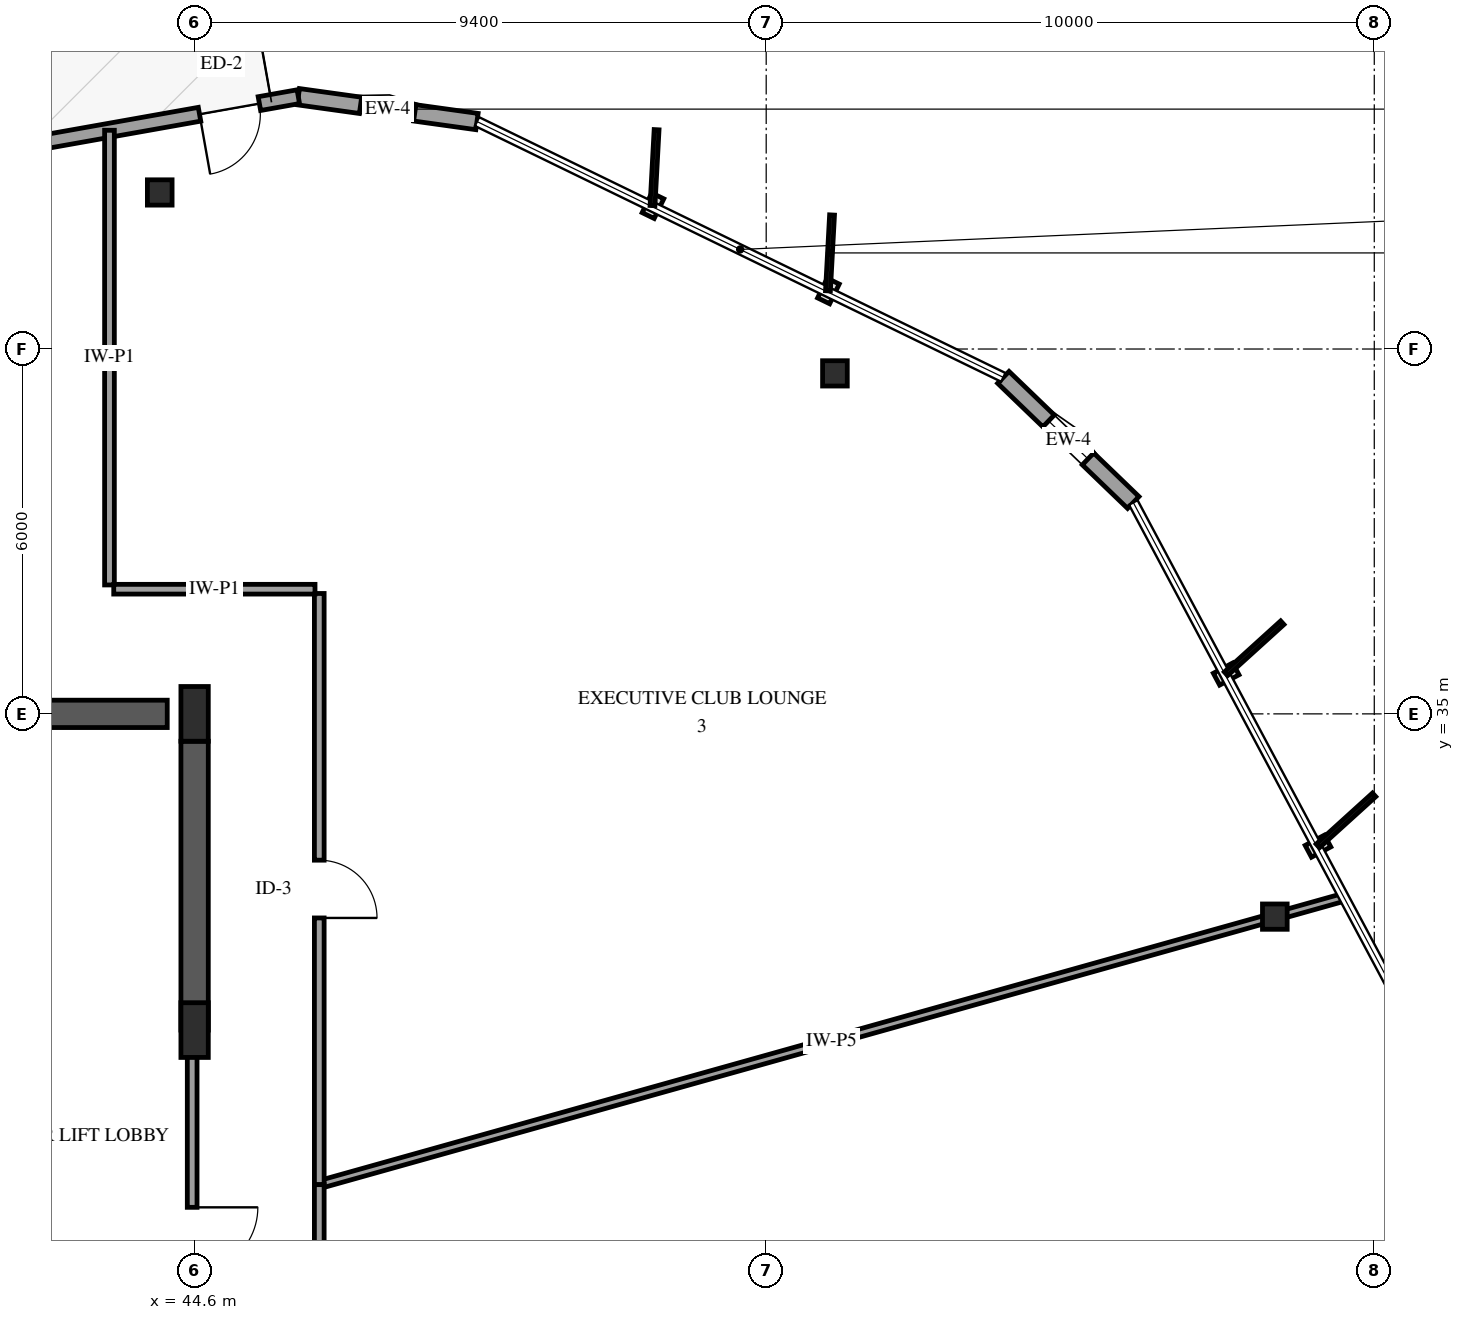
"""IFC4 building model, lengths in metres.
Left out: names, types, materials, properties, quantities, classifications, styles, units other than length and angle.
Written with IfcOpenShell. Run it as: python <this file> out.ifc"""

import sys

from ifc_helpers import new_model, si_unit, direction, frame, frame_2d, origin, origin_2d, place, context, subcontext, project, spatial, rectangle, i_section, extrude, element, fill, save


model = new_model("IFC4")
c1 = context("Model", 3, precision=1e-05, world=origin(), true_north=direction((0.0, 1.0)))
c2 = subcontext(c1, "Body", "Model", "MODEL_VIEW")
j1 = project(units=[si_unit("LENGTHUNIT", "METRE"), si_unit("PLANEANGLEUNIT", "RADIAN")], contexts=[c1])
p1 = place(None, origin())
s1 = spatial("IfcSite", under=j1, at=p1, CompositionType="ELEMENT")
p2 = place(p1, origin())
s2 = spatial("IfcBuilding", under=s1, at=p2, CompositionType="ELEMENT")
p3 = place(p2, frame((0.0, 0.0, 205.0)))
s3 = spatial("IfcBuildingStorey", under=s2, at=p3, CompositionType="ELEMENT", Elevation=205.0)
p4 = place(p3, frame((41.3, 35.0, 0.0), z_axis=(0.0, 0.0, 1.0), x_axis=(1.0, 0.0, 0.0)))
e1 = element("IfcWall", 1, at=p4, inside=s3, PredefinedType="SHEAR", context=c2, shape_type="SweptSolid", body=[
    extrude(rectangle(XDim=2.85, YDim=0.45, at=frame_2d((1.425, 0.0))), origin(), (0.0, 0.0, 1.0), 3.6),
])
p5 = place(p3, frame((44.6, 29.8, 0.0), z_axis=(0.0, 0.0, 1.0), x_axis=(0.0, 1.0, 0.0)))
e2 = element("IfcWall", 2, at=p5, inside=s3, PredefinedType="SHEAR", context=c2, shape_type="SweptSolid", body=[
    extrude(rectangle(XDim=4.75, YDim=0.45, at=frame_2d((2.375, 0.0))), origin(), (0.0, 0.0, 1.0), 3.6),
])
for number, where, z_axis, x_axis in (
    (3, (44.6, 29.8, 0.0), (0.0, 0.0, 1.0), (1.0, 0.0, 0.0)),
    (4, (44.6, 35.0, 0.0), (0.0, 0.0, 1.0), (1.0, 0.0, 0.0)),
):
    element("IfcColumn", number, at=place(p3, frame(where, z_axis=z_axis, x_axis=x_axis)), inside=s3, PredefinedType="PILASTER", context=c2, shape_type="SweptSolid", body=[
        extrude(rectangle(XDim=0.45, YDim=0.9, at=origin_2d()), origin(), (0.0, 0.0, 1.0), 3.6),
    ])
for number, where, z_axis, x_axis in (
    (5, (62.365, 31.666, 0.0), (0.0, 0.0, 1.0), (1.0, 0.0, 0.0)),
    (6, (55.13, 40.599, 0.0), (0.0, 0.0, 1.0), (1.0, 0.0, 0.0)),
    (7, (44.027, 43.574, 0.0), (0.0, 0.0, 1.0), (1.0, 0.0, 0.0)),
):
    element("IfcColumn", number, at=place(p3, frame(where, z_axis=z_axis, x_axis=x_axis)), inside=s3, PredefinedType="COLUMN", context=c2, shape_type="SweptSolid", body=[
        extrude(i_section(OverallWidth=0.406, OverallDepth=0.416, WebThickness=0.03, FlangeThickness=0.048, FilletRadius=0.038, at=origin_2d()), origin(), (0.0, 0.0, 1.0), 3.6),
    ])
p6 = place(p3, frame((49.244, 44.741, 0.0), z_axis=(0.0, 0.0, 1.0), x_axis=(-0.990464529439, 0.137767978586, 0.0)))
e8 = element("IfcWall", 8, at=p6, inside=s3, PredefinedType="SOLIDWALL", context=c2, shape_type="SweptSolid", body=[
    extrude(rectangle(XDim=2.967, YDim=0.27, at=frame_2d((1.483, 0.0))), origin(), (0.0, 0.0, 1.0), 2.679),
])
p7 = place(p6, frame((1.033, 0.0, 0.75)))
e9 = element("IfcOpeningElement", 9, at=p7, cuts=e8, PredefinedType="OPENING", context=c2, shape_type="SweptSolid", body=[
    extrude(rectangle(XDim=0.9, YDim=1.5, at=frame_2d((0.45, 0.75))), frame((0.0, 0.145, 0.0), z_axis=(0.0, -1.0, 0.0), x_axis=(1.0, 0.0, 0.0)), (0.0, 0.0, 1.0), 0.29),
])
p8 = place(p3, frame((46.306, 45.149, 0.0), z_axis=(0.0, 0.0, 1.0), x_axis=(-0.984566490569, -0.175010930084, 0.0)))
e10 = element("IfcWall", 10, at=p8, inside=s3, PredefinedType="SOLIDWALL", context=c2, shape_type="SweptSolid", body=[
    extrude(rectangle(XDim=9.624, YDim=0.23, at=frame_2d((4.812, 0.0))), origin(), (0.0, 0.0, 1.0), 2.679),
])
p9 = place(p8, frame((0.65, 0.0, 0.0)))
e11 = element("IfcOpeningElement", 11, at=p9, cuts=e10, PredefinedType="OPENING", context=c2, shape_type="SweptSolid", body=[
    extrude(rectangle(XDim=1.0, YDim=2.15, at=frame_2d((0.5, 1.075))), frame((0.0, 0.125, 0.0), z_axis=(0.0, -1.0, 0.0), x_axis=(1.0, 0.0, 0.0)), (0.0, 0.0, 1.0), 0.25),
])
p10 = place(p8, frame((5.986, 0.0, 0.72)))
e12 = element("IfcOpeningElement", 12, at=p10, cuts=e10, PredefinedType="OPENING", context=c2, shape_type="SweptSolid", body=[
    extrude(rectangle(XDim=1.35, YDim=1.65, at=frame_2d((0.675, 0.825))), frame((0.0, 0.125, 0.0), z_axis=(0.0, -1.0, 0.0), x_axis=(1.0, 0.0, 0.0)), (0.0, 0.0, 1.0), 0.25),
])
p11 = place(p3, frame((63.76, 17.532, 0.0), z_axis=(0.0, 0.0, 1.0), x_axis=(0.137794425401, 0.990460850477, 0.0)))
e13 = element("IfcWall", 13, at=p11, inside=s3, PredefinedType="SOLIDWALL", context=c2, shape_type="SweptSolid", body=[
    extrude(rectangle(XDim=9.624, YDim=0.23, at=frame_2d((4.812, 0.0))), origin(), (0.0, 0.0, 1.0), 2.679),
])
p12 = place(p11, frame((4.312, 0.0, 0.0)))
e14 = element("IfcOpeningElement", 14, at=p12, cuts=e13, PredefinedType="OPENING", context=c2, shape_type="SweptSolid", body=[
    extrude(rectangle(XDim=1.0, YDim=2.15, at=frame_2d((0.5, 1.075))), frame((0.0, 0.125, 0.0), z_axis=(0.0, -1.0, 0.0), x_axis=(1.0, 0.0, 0.0)), (0.0, 0.0, 1.0), 0.25),
])
p13 = place(p11, frame((0.44, 0.0, 0.72)))
e15 = element("IfcOpeningElement", 15, at=p13, cuts=e13, PredefinedType="OPENING", context=c2, shape_type="SweptSolid", body=[
    extrude(rectangle(XDim=1.35, YDim=1.65, at=frame_2d((0.675, 0.825))), frame((0.0, 0.125, 0.0), z_axis=(0.0, -1.0, 0.0), x_axis=(1.0, 0.0, 0.0)), (0.0, 0.0, 1.0), 0.25),
])
p14 = place(p11, frame((5.952, 0.0, 0.72)))
e16 = element("IfcOpeningElement", 16, at=p14, cuts=e13, PredefinedType="OPENING", context=c2, shape_type="SweptSolid", body=[
    extrude(rectangle(XDim=1.35, YDim=1.65, at=frame_2d((0.675, 0.825))), frame((0.0, 0.125, 0.0), z_axis=(0.0, -1.0, 0.0), x_axis=(1.0, 0.0, 0.0)), (0.0, 0.0, 1.0), 0.25),
])
p15 = place(p3, frame((60.037, 38.476, 0.0), z_axis=(0.0, 0.0, 1.0), x_axis=(-0.720273000242, 0.69369071287, 0.0)))
e17 = element("IfcWall", 17, at=p15, inside=s3, PredefinedType="SOLIDWALL", context=c2, shape_type="SweptSolid", body=[
    extrude(rectangle(XDim=2.967, YDim=0.27, at=frame_2d((1.483, 0.0))), origin(), (0.0, 0.0, 1.0), 2.679),
])
p16 = place(p15, frame((1.033, 0.0, 0.75)))
e18 = element("IfcOpeningElement", 18, at=p16, cuts=e17, PredefinedType="OPENING", context=c2, shape_type="SweptSolid", body=[
    extrude(rectangle(XDim=0.9, YDim=1.5, at=frame_2d((0.45, 0.75))), frame((0.0, 0.145, 0.0), z_axis=(0.0, -1.0, 0.0), x_axis=(1.0, 0.0, 0.0)), (0.0, 0.0, 1.0), 0.29),
])
p17 = place(p3, frame((63.5, 31.984, 0.0), z_axis=(0.0, 0.0, 1.0), x_axis=(-0.962848165135, -0.270043350032, 0.0)))
e19 = element("IfcWall", 19, at=p17, inside=s3, PredefinedType="PARTITIONING", context=c2, shape_type="SweptSolid", body=[
    extrude(rectangle(XDim=17.5, YDim=0.13, at=frame_2d((8.75, 0.0))), origin(), (0.0, 0.0, 1.0), 3.3),
])
p18 = place(p3, frame((46.65, 36.98, 0.0), z_axis=(0.0, 0.0, 1.0), x_axis=(0.0, -1.0, 0.0)))
e20 = element("IfcWall", 20, at=p18, inside=s3, PredefinedType="PARTITIONING", context=c2, shape_type="SweptSolid", body=[
    extrude(rectangle(XDim=9.722, YDim=0.16, at=frame_2d((4.861, 0.0))), origin(), (0.0, 0.0, 1.0), 3.3),
])
p19 = place(p18, frame((4.386, 0.0, 0.0)))
e21 = element("IfcOpeningElement", 21, at=p19, cuts=e20, PredefinedType="OPENING", context=c2, shape_type="SweptSolid", body=[
    extrude(rectangle(XDim=0.95, YDim=2.15, at=frame_2d((0.475, 1.075))), frame((0.0, 0.09, 0.0), z_axis=(0.0, -1.0, 0.0), x_axis=(1.0, 0.0, 0.0)), (0.0, 0.0, 1.0), 0.18),
])
p20 = place(p3, frame((46.65, 27.258, 0.0), z_axis=(0.0, 0.0, 1.0), x_axis=(0.0, -1.0, 0.0)))
e22 = element("IfcWall", 22, at=p20, inside=s3, PredefinedType="PARTITIONING", context=c2, shape_type="SweptSolid", body=[
    extrude(rectangle(XDim=8.685, YDim=0.16, at=frame_2d((4.343, 0.0))), origin(), (0.0, 0.0, 1.0), 3.3),
])
p21 = place(p20, frame((3.867, 0.0, 0.0)))
e23 = element("IfcOpeningElement", 23, at=p21, cuts=e22, PredefinedType="OPENING", context=c2, shape_type="SweptSolid", body=[
    extrude(rectangle(XDim=0.95, YDim=2.15, at=frame_2d((0.475, 1.075))), frame((0.0, 0.09, 0.0), z_axis=(0.0, -1.0, 0.0), x_axis=(1.0, 0.0, 0.0)), (0.0, 0.0, 1.0), 0.18),
])
p22 = place(p3, frame((43.2, 44.597, 0.0), z_axis=(0.0, 0.0, 1.0), x_axis=(0.0, -1.0, 0.0)))
e24 = element("IfcWall", 24, at=p22, inside=s3, PredefinedType="PARTITIONING", context=c2, shape_type="SweptSolid", body=[
    extrude(rectangle(XDim=7.477, YDim=0.16, at=frame_2d((3.738, 0.0))), origin(), (0.0, 0.0, 1.0), 2.595),
])
p23 = place(p3, frame((44.56, 29.8, 0.0), z_axis=(0.0, 0.0, 1.0), x_axis=(0.0, -1.0, 0.0)))
e25 = element("IfcWall", 25, at=p23, inside=s3, PredefinedType="PARTITIONING", context=c2, shape_type="SweptSolid", body=[
    extrude(rectangle(XDim=6.91, YDim=0.16, at=frame_2d((3.455, 0.0))), origin(), (0.0, 0.0, 1.0), 2.34),
])
p24 = place(p23, frame((2.915, 0.0, 0.0)))
e26 = element("IfcOpeningElement", 26, at=p24, cuts=e25, PredefinedType="OPENING", context=c2, shape_type="SweptSolid", body=[
    extrude(rectangle(XDim=1.08, YDim=2.15, at=frame_2d((0.54, 1.075))), frame((0.0, 0.09, 0.0), z_axis=(0.0, -1.0, 0.0), x_axis=(1.0, 0.0, 0.0)), (0.0, 0.0, 1.0), 0.18),
])
p25 = place(p3, frame((43.27, 37.05, 0.0), z_axis=(0.0, 0.0, 1.0), x_axis=(1.0, 0.0, 0.0)))
e27 = element("IfcWall", 27, at=p25, inside=s3, PredefinedType="PARTITIONING", context=c2, shape_type="SweptSolid", body=[
    extrude(rectangle(XDim=3.31, YDim=0.16, at=frame_2d((1.655, 0.0))), origin(), (0.0, 0.0, 1.0), 3.3),
])
p26 = place(p7, origin())
e28 = element("IfcWindow", 28, at=p26, inside=s3, PartitioningType="SINGLE_PANEL", PredefinedType="WINDOW", context=c2, shape_type="SweptSolid", body=[
    extrude(rectangle(XDim=0.9, YDim=1.5, at=frame_2d((0.45, 0.75))), frame((0.0, 0.03, 0.0), z_axis=(0.0, -1.0, 0.0), x_axis=(1.0, 0.0, 0.0)), (0.0, 0.0, 1.0), 0.06),
])
fill(e9, e28)
p27 = place(p9, origin())
e29 = element("IfcDoor", 29, at=p27, inside=s3, OperationType="SINGLE_SWING_RIGHT", PredefinedType="DOOR", context=c2, shape_type="SweptSolid", body=[
    extrude(rectangle(XDim=1.0, YDim=2.15, at=frame_2d((0.5, 1.075))), frame((0.0, 0.025, 0.0), z_axis=(0.0, -1.0, 0.0), x_axis=(1.0, 0.0, 0.0)), (0.0, 0.0, 1.0), 0.05),
])
fill(e11, e29)
p28 = place(p16, origin())
e30 = element("IfcWindow", 30, at=p28, inside=s3, PartitioningType="SINGLE_PANEL", PredefinedType="WINDOW", context=c2, shape_type="SweptSolid", body=[
    extrude(rectangle(XDim=0.9, YDim=1.5, at=frame_2d((0.45, 0.75))), frame((0.0, 0.03, 0.0), z_axis=(0.0, -1.0, 0.0), x_axis=(1.0, 0.0, 0.0)), (0.0, 0.0, 1.0), 0.06),
])
fill(e18, e30)
p29 = place(p19, origin())
e31 = element("IfcDoor", 31, at=p29, inside=s3, OperationType="SINGLE_SWING_RIGHT", PredefinedType="DOOR", context=c2, shape_type="SweptSolid", body=[
    extrude(rectangle(XDim=0.95, YDim=2.15, at=frame_2d((0.475, 1.075))), frame((0.0, 0.025, 0.0), z_axis=(0.0, -1.0, 0.0), x_axis=(1.0, 0.0, 0.0)), (0.0, 0.0, 1.0), 0.05),
])
fill(e21, e31)
p30 = place(p24, origin())
e32 = element("IfcDoor", 32, at=p30, inside=s3, OperationType="SINGLE_SWING_LEFT", PredefinedType="DOOR", context=c2, shape_type="SweptSolid", body=[
    extrude(rectangle(XDim=1.08, YDim=2.15, at=frame_2d((0.54, 1.075))), frame((0.0, 0.025, 0.0), z_axis=(0.0, -1.0, 0.0), x_axis=(1.0, 0.0, 0.0)), (0.0, 0.0, 1.0), 0.05),
])
fill(e26, e32)
save(model, sys.argv[1])
